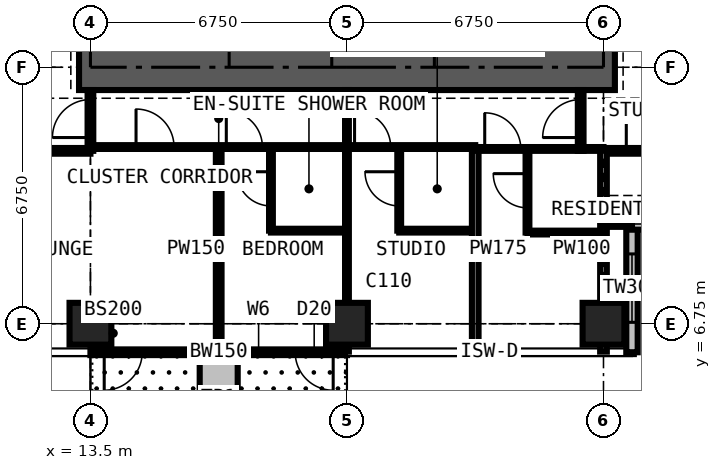
"""IFC4 building model, lengths in metres.
Left out: names, types, materials, properties, quantities, classifications, styles, units other than length and angle.
Written with IfcOpenShell. Run it as: python <this file> out.ifc"""

import sys

from ifc_helpers import new_model, si_unit, direction, frame, frame_2d, origin, origin_2d, place, context, subcontext, project, spatial, rectangle, extrude, element, fill, save


model = new_model("IFC4")
c1 = context("Model", 3, precision=1e-05, world=origin(), true_north=direction((0.0, 1.0)))
c2 = subcontext(c1, "Body", "Model", "MODEL_VIEW")
j1 = project(units=[si_unit("LENGTHUNIT", "METRE"), si_unit("PLANEANGLEUNIT", "RADIAN")], contexts=[c1])
p1 = place(None, origin())
s1 = spatial("IfcSite", under=j1, at=p1, CompositionType="ELEMENT")
p2 = place(p1, origin())
s2 = spatial("IfcBuilding", under=s1, at=p2, CompositionType="ELEMENT")
p3 = place(p2, frame((0.0, 0.0, 211.5)))
s3 = spatial("IfcBuildingStorey", under=s2, at=p3, CompositionType="ELEMENT", Elevation=211.5)
for number, where, z_axis, x_axis in (
    (1, (13.5, 6.75, 0.0), (0.0, 0.0, 1.0), (1.0, 0.0, 0.0)),
    (2, (20.25, 6.75, 0.0), (0.0, 0.0, 1.0), (1.0, 0.0, 0.0)),
    (3, (27.0, 6.75, 0.0), (0.0, 0.0, 1.0), (1.0, 0.0, 0.0)),
):
    element("IfcColumn", number, at=place(p3, frame(where, z_axis=z_axis, x_axis=x_axis)), inside=s3, PredefinedType="COLUMN", context=c2, shape_type="SweptSolid", body=[
        extrude(rectangle(XDim=1.1, YDim=1.1, at=origin_2d()), origin(), (0.0, 0.0, 1.0), 3.6),
    ])
p4 = place(p3, frame((13.2, 13.5, 0.0), z_axis=(0.0, 0.0, 1.0), x_axis=(1.0, 0.0, 0.0)))
e4 = element("IfcWall", 4, at=p4, inside=s3, PredefinedType="SHEAR", context=c2, shape_type="SweptSolid", body=[
    extrude(rectangle(XDim=14.1, YDim=1.2, at=frame_2d((7.05, 0.0))), origin(), (0.0, 0.0, 1.0), 3.6),
])
p5 = place(p3, frame((20.25, 6.0, 0.0), z_axis=(0.0, 0.0, 1.0), x_axis=(-1.0, 0.0, 0.0)))
e5 = element("IfcWall", 5, at=p5, inside=s3, PredefinedType="SOLIDWALL", context=c2, shape_type="SweptSolid", body=[
    extrude(rectangle(XDim=6.75, YDim=0.15, at=frame_2d((3.375, 0.0))), origin(), (0.0, 0.0, 1.0), 3.375),
])
p6 = place(p5, frame((0.363, 0.0, 0.0)))
e6 = element("IfcOpeningElement", 6, at=p6, cuts=e5, PredefinedType="OPENING", context=c2, shape_type="SweptSolid", body=[
    extrude(rectangle(XDim=1.0, YDim=2.2, at=frame_2d((0.5, 1.1))), frame((0.0, 0.085, 0.0), z_axis=(0.0, -1.0, 0.0), x_axis=(1.0, 0.0, 0.0)), (0.0, 0.0, 1.0), 0.17),
])
p7 = place(p5, frame((1.725, 0.0, 0.9)))
e7 = element("IfcOpeningElement", 7, at=p7, cuts=e5, PredefinedType="OPENING", context=c2, shape_type="SweptSolid", body=[
    extrude(rectangle(XDim=1.2, YDim=1.8, at=frame_2d((0.6, 0.9))), frame((0.0, 0.085, 0.0), z_axis=(0.0, -1.0, 0.0), x_axis=(1.0, 0.0, 0.0)), (0.0, 0.0, 1.0), 0.17),
])
p8 = place(p5, frame((5.387, 0.0, 0.0)))
e8 = element("IfcOpeningElement", 8, at=p8, cuts=e5, PredefinedType="OPENING", context=c2, shape_type="SweptSolid", body=[
    extrude(rectangle(XDim=1.0, YDim=2.2, at=frame_2d((0.5, 1.1))), frame((0.0, 0.085, 0.0), z_axis=(0.0, -1.0, 0.0), x_axis=(1.0, 0.0, 0.0)), (0.0, 0.0, 1.0), 0.17),
])
p9 = place(p5, frame((3.825, 0.0, 0.9)))
e9 = element("IfcOpeningElement", 9, at=p9, cuts=e5, PredefinedType="OPENING", context=c2, shape_type="SweptSolid", body=[
    extrude(rectangle(XDim=1.2, YDim=1.8, at=frame_2d((0.6, 0.9))), frame((0.0, 0.085, 0.0), z_axis=(0.0, -1.0, 0.0), x_axis=(1.0, 0.0, 0.0)), (0.0, 0.0, 1.0), 0.17),
])
p10 = place(p3, frame((27.75, 6.0, 0.0), z_axis=(0.0, 0.0, 1.0), x_axis=(0.0, 1.0, 0.0)))
e10 = element("IfcWall", 10, at=p10, inside=s3, PredefinedType="SOLIDWALL", context=c2, shape_type="SweptSolid", body=[
    extrude(rectangle(XDim=3.375, YDim=0.3, at=frame_2d((1.688, 0.0))), origin(), (0.0, 0.0, 1.0), 3.375),
])
p11 = place(p10, frame((0.788, 0.0, 0.6)))
e11 = element("IfcOpeningElement", 11, at=p11, cuts=e10, PredefinedType="OPENING", context=c2, shape_type="SweptSolid", body=[
    extrude(rectangle(XDim=1.8, YDim=2.1, at=frame_2d((0.9, 1.05))), frame((0.0, 0.16, 0.0), z_axis=(0.0, -1.0, 0.0), x_axis=(1.0, 0.0, 0.0)), (0.0, 0.0, 1.0), 0.32),
])
p12 = place(p3, frame((27.75, 9.375, 0.0), z_axis=(0.0, 0.0, 1.0), x_axis=(1.0, 0.0, 0.0)))
e12 = element("IfcWall", 12, at=p12, inside=s3, PredefinedType="SOLIDWALL", context=c2, shape_type="SweptSolid", body=[
    extrude(rectangle(XDim=3.375, YDim=0.3, at=frame_2d((1.688, 0.0))), origin(), (0.0, 0.0, 1.0), 3.375),
])
p13 = place(p12, frame((0.788, 0.0, 0.6)))
e13 = element("IfcOpeningElement", 13, at=p13, cuts=e12, PredefinedType="OPENING", context=c2, shape_type="SweptSolid", body=[
    extrude(rectangle(XDim=1.8, YDim=2.1, at=frame_2d((0.9, 1.05))), frame((0.0, 0.16, 0.0), z_axis=(0.0, -1.0, 0.0), x_axis=(1.0, 0.0, 0.0)), (0.0, 0.0, 1.0), 0.32),
])
p14 = place(p3, frame((16.875, 5.9, 0.0), z_axis=(0.0, 0.0, 1.0), x_axis=(0.0, -1.0, 0.0)))
e14 = element("IfcWall", 14, at=p14, inside=s3, PredefinedType="USERDEFINED", context=c2, shape_type="SweptSolid", body=[
    extrude(rectangle(XDim=2.2, YDim=1.0, at=frame_2d((1.1, 0.0))), origin(), (0.0, 0.0, 1.0), 0.9),
])
p15 = place(p3, frame((10.125, 11.3, 0.0), z_axis=(0.0, 0.0, 1.0), x_axis=(1.0, 0.0, 0.0)))
e15 = element("IfcWall", 15, at=p15, inside=s3, PredefinedType="PARTITIONING", context=c2, shape_type="SweptSolid", body=[
    extrude(rectangle(XDim=3.375, YDim=0.15, at=frame_2d((1.688, 0.0))), origin(), (0.0, 0.0, 1.0), 3.375),
])
p16 = place(p3, frame((13.5, 11.3, 0.0), z_axis=(0.0, 0.0, 1.0), x_axis=(0.0, 1.0, 0.0)))
e16 = element("IfcWall", 16, at=p16, inside=s3, PredefinedType="PARTITIONING", context=c2, shape_type="SweptSolid", body=[
    extrude(rectangle(XDim=1.6, YDim=0.15, at=frame_2d((0.8, 0.0))), origin(), (0.0, 0.0, 1.0), 2.877),
])
p17 = place(p16, frame((0.35, 0.0, 0.0)))
e17 = element("IfcOpeningElement", 17, at=p17, cuts=e16, PredefinedType="OPENING", context=c2, shape_type="SweptSolid", body=[
    extrude(rectangle(XDim=1.0, YDim=2.2, at=frame_2d((0.5, 1.1))), frame((0.0, 0.085, 0.0), z_axis=(0.0, -1.0, 0.0), x_axis=(1.0, 0.0, 0.0)), (0.0, 0.0, 1.0), 0.17),
])
p18 = place(p3, frame((13.5, 11.4, 0.0), z_axis=(0.0, 0.0, 1.0), x_axis=(1.0, 0.0, 0.0)))
e18 = element("IfcWall", 18, at=p18, inside=s3, PredefinedType="PARTITIONING", context=c2, shape_type="SweptSolid", body=[
    extrude(rectangle(XDim=10.125, YDim=0.1, at=frame_2d((5.062, 0.0))), origin(), (0.0, 0.0, 1.0), 3.375),
])
p19 = place(p18, frame((1.2, 0.0, 0.0)))
e19 = element("IfcOpeningElement", 19, at=p19, cuts=e18, PredefinedType="OPENING", context=c2, shape_type="SweptSolid", body=[
    extrude(rectangle(XDim=1.0, YDim=2.2, at=frame_2d((0.5, 1.1))), frame((0.0, 0.06, 0.0), z_axis=(0.0, -1.0, 0.0), x_axis=(1.0, 0.0, 0.0)), (0.0, 0.0, 1.0), 0.12),
])
p20 = place(p18, frame((3.575, 0.0, 0.0)))
e20 = element("IfcOpeningElement", 20, at=p20, cuts=e18, PredefinedType="OPENING", context=c2, shape_type="SweptSolid", body=[
    extrude(rectangle(XDim=0.95, YDim=2.2, at=frame_2d((0.475, 1.1))), frame((0.0, 0.06, 0.0), z_axis=(0.0, -1.0, 0.0), x_axis=(1.0, 0.0, 0.0)), (0.0, 0.0, 1.0), 0.12),
])
p21 = place(p18, frame((6.95, 0.0, 0.0)))
e21 = element("IfcOpeningElement", 21, at=p21, cuts=e18, PredefinedType="OPENING", context=c2, shape_type="SweptSolid", body=[
    extrude(rectangle(XDim=0.95, YDim=2.2, at=frame_2d((0.475, 1.1))), frame((0.0, 0.06, 0.0), z_axis=(0.0, -1.0, 0.0), x_axis=(1.0, 0.0, 0.0)), (0.0, 0.0, 1.0), 0.12),
])
p22 = place(p3, frame((16.875, 6.016, 0.0), z_axis=(0.0, 0.0, 1.0), x_axis=(0.0, 1.0, 0.0)))
e22 = element("IfcWall", 22, at=p22, inside=s3, PredefinedType="PARTITIONING", context=c2, shape_type="SweptSolid", body=[
    extrude(rectangle(XDim=5.384, YDim=0.15, at=frame_2d((2.692, 0.0))), origin(), (0.0, 0.0, 1.0), 3.375),
])
p23 = place(p3, frame((18.25, 9.2, 0.0), z_axis=(0.0, 0.0, 1.0), x_axis=(0.0, 1.0, 0.0)))
e23 = element("IfcWall", 23, at=p23, inside=s3, PredefinedType="PARTITIONING", context=c2, shape_type="SweptSolid", body=[
    extrude(rectangle(XDim=2.2, YDim=0.1, at=frame_2d((1.1, 0.0))), origin(), (0.0, 0.0, 1.0), 3.375),
])
p24 = place(p23, frame((0.65, 0.0, 0.0)))
e24 = element("IfcOpeningElement", 24, at=p24, cuts=e23, PredefinedType="OPENING", context=c2, shape_type="SweptSolid", body=[
    extrude(rectangle(XDim=0.9, YDim=2.2, at=frame_2d((0.45, 1.1))), frame((0.0, 0.06, 0.0), z_axis=(0.0, -1.0, 0.0), x_axis=(1.0, 0.0, 0.0)), (0.0, 0.0, 1.0), 0.12),
])
p25 = place(p3, frame((18.25, 9.2, 0.0), z_axis=(0.0, 0.0, 1.0), x_axis=(1.0, 0.0, 0.0)))
e25 = element("IfcWall", 25, at=p25, inside=s3, PredefinedType="PARTITIONING", context=c2, shape_type="SweptSolid", body=[
    extrude(rectangle(XDim=2.0, YDim=0.1, at=frame_2d((1.0, 0.0))), origin(), (0.0, 0.0, 1.0), 3.375),
])
p26 = place(p3, frame((20.25, 6.016, 0.0), z_axis=(0.0, 0.0, 1.0), x_axis=(0.0, 1.0, 0.0)))
e26 = element("IfcWall", 26, at=p26, inside=s3, PredefinedType="PARTITIONING", context=c2, shape_type="SweptSolid", body=[
    extrude(rectangle(XDim=6.884, YDim=0.1, at=frame_2d((3.442, 0.0))), origin(), (0.0, 0.0, 1.0), 2.877),
])
p27 = place(p3, frame((21.625, 9.2, 0.0), z_axis=(0.0, 0.0, 1.0), x_axis=(0.0, 1.0, 0.0)))
e27 = element("IfcWall", 27, at=p27, inside=s3, PredefinedType="PARTITIONING", context=c2, shape_type="SweptSolid", body=[
    extrude(rectangle(XDim=2.2, YDim=0.1, at=frame_2d((1.1, 0.0))), origin(), (0.0, 0.0, 1.0), 3.375),
])
p28 = place(p27, frame((0.65, 0.0, 0.0)))
e28 = element("IfcOpeningElement", 28, at=p28, cuts=e27, PredefinedType="OPENING", context=c2, shape_type="SweptSolid", body=[
    extrude(rectangle(XDim=0.9, YDim=2.2, at=frame_2d((0.45, 1.1))), frame((0.0, 0.06, 0.0), z_axis=(0.0, -1.0, 0.0), x_axis=(1.0, 0.0, 0.0)), (0.0, 0.0, 1.0), 0.12),
])
p29 = place(p3, frame((21.625, 9.2, 0.0), z_axis=(0.0, 0.0, 1.0), x_axis=(1.0, 0.0, 0.0)))
e29 = element("IfcWall", 29, at=p29, inside=s3, PredefinedType="PARTITIONING", context=c2, shape_type="SweptSolid", body=[
    extrude(rectangle(XDim=2.0, YDim=0.1, at=frame_2d((1.0, 0.0))), origin(), (0.0, 0.0, 1.0), 3.375),
])
p30 = place(p3, frame((23.625, 6.016, 0.0), z_axis=(0.0, 0.0, 1.0), x_axis=(0.0, 1.0, 0.0)))
e30 = element("IfcWall", 30, at=p30, inside=s3, PredefinedType="PARTITIONING", context=c2, shape_type="SweptSolid", body=[
    extrude(rectangle(XDim=5.384, YDim=0.175, at=frame_2d((2.692, 0.0))), origin(), (0.0, 0.0, 1.0), 3.375),
])
p31 = place(p3, frame((23.625, 11.35, 0.0), z_axis=(0.0, 0.0, 1.0), x_axis=(1.0, 0.0, 0.0)))
e31 = element("IfcWall", 31, at=p31, inside=s3, PredefinedType="PARTITIONING", context=c2, shape_type="SweptSolid", body=[
    extrude(rectangle(XDim=3.375, YDim=0.1, at=frame_2d((1.688, 0.0))), origin(), (0.0, 0.0, 1.0), 3.375),
])
p32 = place(p31, frame((0.25, 0.0, 0.0)))
e32 = element("IfcOpeningElement", 32, at=p32, cuts=e31, PredefinedType="OPENING", context=c2, shape_type="SweptSolid", body=[
    extrude(rectangle(XDim=0.95, YDim=2.2, at=frame_2d((0.475, 1.1))), frame((0.0, 0.06, 0.0), z_axis=(0.0, -1.0, 0.0), x_axis=(1.0, 0.0, 0.0)), (0.0, 0.0, 1.0), 0.12),
])
p33 = place(p3, frame((25.0, 9.15, 0.0), z_axis=(0.0, 0.0, 1.0), x_axis=(0.0, 1.0, 0.0)))
e33 = element("IfcWall", 33, at=p33, inside=s3, PredefinedType="PARTITIONING", context=c2, shape_type="SweptSolid", body=[
    extrude(rectangle(XDim=2.2, YDim=0.1, at=frame_2d((1.1, 0.0))), origin(), (0.0, 0.0, 1.0), 3.375),
])
p34 = place(p33, frame((0.65, 0.0, 0.0)))
e34 = element("IfcOpeningElement", 34, at=p34, cuts=e33, PredefinedType="OPENING", context=c2, shape_type="SweptSolid", body=[
    extrude(rectangle(XDim=0.9, YDim=2.2, at=frame_2d((0.45, 1.1))), frame((0.0, 0.06, 0.0), z_axis=(0.0, -1.0, 0.0), x_axis=(1.0, 0.0, 0.0)), (0.0, 0.0, 1.0), 0.12),
])
p35 = place(p3, frame((25.0, 9.15, 0.0), z_axis=(0.0, 0.0, 1.0), x_axis=(1.0, 0.0, 0.0)))
e35 = element("IfcWall", 35, at=p35, inside=s3, PredefinedType="PARTITIONING", context=c2, shape_type="SweptSolid", body=[
    extrude(rectangle(XDim=2.0, YDim=0.1, at=frame_2d((1.0, 0.0))), origin(), (0.0, 0.0, 1.0), 3.375),
])
p36 = place(p3, frame((26.4, 11.3, 0.0), z_axis=(0.0, 0.0, 1.0), x_axis=(0.0, 1.0, 0.0)))
e36 = element("IfcWall", 36, at=p36, inside=s3, PredefinedType="PARTITIONING", context=c2, shape_type="SweptSolid", body=[
    extrude(rectangle(XDim=1.6, YDim=0.15, at=frame_2d((0.8, 0.0))), origin(), (0.0, 0.0, 1.0), 3.375),
])
p37 = place(p36, frame((0.35, 0.0, 0.0)))
e37 = element("IfcOpeningElement", 37, at=p37, cuts=e36, PredefinedType="OPENING", context=c2, shape_type="SweptSolid", body=[
    extrude(rectangle(XDim=1.0, YDim=2.2, at=frame_2d((0.5, 1.1))), frame((0.0, 0.085, 0.0), z_axis=(0.0, -1.0, 0.0), x_axis=(1.0, 0.0, 0.0)), (0.0, 0.0, 1.0), 0.17),
])
p38 = place(p3, frame((27.0, 11.3, 0.0), z_axis=(0.0, 0.0, 1.0), x_axis=(1.0, 0.0, 0.0)))
e38 = element("IfcWall", 38, at=p38, inside=s3, PredefinedType="PARTITIONING", context=c2, shape_type="SweptSolid", body=[
    extrude(rectangle(XDim=3.375, YDim=0.15, at=frame_2d((1.688, 0.0))), origin(), (0.0, 0.0, 1.0), 3.375),
])
p39 = place(p38, frame((0.6, 0.0, 0.0)))
e39 = element("IfcOpeningElement", 39, at=p39, cuts=e38, PredefinedType="OPENING", context=c2, shape_type="SweptSolid", body=[
    extrude(rectangle(XDim=1.0, YDim=2.2, at=frame_2d((0.5, 1.1))), frame((0.0, 0.085, 0.0), z_axis=(0.0, -1.0, 0.0), x_axis=(1.0, 0.0, 0.0)), (0.0, 0.0, 1.0), 0.17),
])
p40 = place(p3, frame((27.0, 6.016, 0.0), z_axis=(0.0, 0.0, 1.0), x_axis=(0.0, 1.0, 0.0)))
e40 = element("IfcWall", 40, at=p40, inside=s3, PredefinedType="PARTITIONING", context=c2, shape_type="SweptSolid", body=[
    extrude(rectangle(XDim=5.334, YDim=0.175, at=frame_2d((2.667, 0.0))), origin(), (0.0, 0.0, 1.0), 2.877),
])
p41 = place(p3, frame((27.0, 9.375, 0.0), z_axis=(0.0, 0.0, 1.0), x_axis=(1.0, 0.0, 0.0)))
e41 = element("IfcWall", 41, at=p41, inside=s3, PredefinedType="PARTITIONING", context=c2, shape_type="SweptSolid", body=[
    extrude(rectangle(XDim=0.734, YDim=0.15, at=frame_2d((0.367, 0.0))), origin(), (0.0, 0.0, 1.0), 3.375),
])
p42 = place(p6, origin())
e42 = element("IfcDoor", 42, at=p42, inside=s3, OperationType="SINGLE_SWING_LEFT", PredefinedType="DOOR", context=c2, shape_type="SweptSolid", body=[
    extrude(rectangle(XDim=1.0, YDim=2.2, at=frame_2d((0.5, 1.1))), frame((0.0, 0.025, 0.0), z_axis=(0.0, -1.0, 0.0), x_axis=(1.0, 0.0, 0.0)), (0.0, 0.0, 1.0), 0.05),
])
fill(e6, e42)
p43 = place(p7, origin())
e43 = element("IfcWindow", 43, at=p43, inside=s3, PartitioningType="SINGLE_PANEL", PredefinedType="WINDOW", context=c2, shape_type="SweptSolid", body=[
    extrude(rectangle(XDim=1.2, YDim=1.8, at=frame_2d((0.6, 0.9))), frame((0.0, 0.03, 0.0), z_axis=(0.0, -1.0, 0.0), x_axis=(1.0, 0.0, 0.0)), (0.0, 0.0, 1.0), 0.06),
])
fill(e7, e43)
p44 = place(p8, origin())
e44 = element("IfcDoor", 44, at=p44, inside=s3, OperationType="SINGLE_SWING_RIGHT", PredefinedType="DOOR", context=c2, shape_type="SweptSolid", body=[
    extrude(rectangle(XDim=1.0, YDim=2.2, at=frame_2d((0.5, 1.1))), frame((0.0, 0.025, 0.0), z_axis=(0.0, -1.0, 0.0), x_axis=(1.0, 0.0, 0.0)), (0.0, 0.0, 1.0), 0.05),
])
fill(e8, e44)
p45 = place(p9, origin())
e45 = element("IfcWindow", 45, at=p45, inside=s3, PartitioningType="SINGLE_PANEL", PredefinedType="WINDOW", context=c2, shape_type="SweptSolid", body=[
    extrude(rectangle(XDim=1.2, YDim=1.8, at=frame_2d((0.6, 0.9))), frame((0.0, 0.03, 0.0), z_axis=(0.0, -1.0, 0.0), x_axis=(1.0, 0.0, 0.0)), (0.0, 0.0, 1.0), 0.06),
])
fill(e9, e45)
p46 = place(p11, origin())
e46 = element("IfcWindow", 46, at=p46, inside=s3, PartitioningType="SINGLE_PANEL", PredefinedType="WINDOW", context=c2, shape_type="SweptSolid", body=[
    extrude(rectangle(XDim=1.8, YDim=2.1, at=frame_2d((0.9, 1.05))), frame((0.0, 0.03, 0.0), z_axis=(0.0, -1.0, 0.0), x_axis=(1.0, 0.0, 0.0)), (0.0, 0.0, 1.0), 0.06),
])
fill(e11, e46)
p47 = place(p19, origin())
e47 = element("IfcDoor", 47, at=p47, inside=s3, OperationType="SINGLE_SWING_LEFT", PredefinedType="DOOR", context=c2, shape_type="SweptSolid", body=[
    extrude(rectangle(XDim=1.0, YDim=2.2, at=frame_2d((0.5, 1.1))), frame((0.0, 0.025, 0.0), z_axis=(0.0, -1.0, 0.0), x_axis=(1.0, 0.0, 0.0)), (0.0, 0.0, 1.0), 0.05),
])
fill(e19, e47)
p48 = place(p20, origin())
e48 = element("IfcDoor", 48, at=p48, inside=s3, OperationType="SINGLE_SWING_LEFT", PredefinedType="DOOR", context=c2, shape_type="SweptSolid", body=[
    extrude(rectangle(XDim=0.95, YDim=2.2, at=frame_2d((0.475, 1.1))), frame((0.0, 0.025, 0.0), z_axis=(0.0, -1.0, 0.0), x_axis=(1.0, 0.0, 0.0)), (0.0, 0.0, 1.0), 0.05),
])
fill(e20, e48)
p49 = place(p24, origin())
e49 = element("IfcDoor", 49, at=p49, inside=s3, OperationType="SINGLE_SWING_RIGHT", PredefinedType="DOOR", context=c2, shape_type="SweptSolid", body=[
    extrude(rectangle(XDim=0.9, YDim=2.2, at=frame_2d((0.45, 1.1))), frame((0.0, 0.025, 0.0), z_axis=(0.0, -1.0, 0.0), x_axis=(1.0, 0.0, 0.0)), (0.0, 0.0, 1.0), 0.05),
])
fill(e24, e49)
p50 = place(p17, origin())
e50 = element("IfcDoor", 50, at=p50, inside=s3, OperationType="SINGLE_SWING_LEFT", PredefinedType="DOOR", context=c2, shape_type="SweptSolid", body=[
    extrude(rectangle(XDim=1.0, YDim=2.2, at=frame_2d((0.5, 1.1))), frame((0.0, 0.025, 0.0), z_axis=(0.0, -1.0, 0.0), x_axis=(1.0, 0.0, 0.0)), (0.0, 0.0, 1.0), 0.05),
])
fill(e17, e50)
p51 = place(p21, origin())
e51 = element("IfcDoor", 51, at=p51, inside=s3, OperationType="SINGLE_SWING_LEFT", PredefinedType="DOOR", context=c2, shape_type="SweptSolid", body=[
    extrude(rectangle(XDim=0.95, YDim=2.2, at=frame_2d((0.475, 1.1))), frame((0.0, 0.025, 0.0), z_axis=(0.0, -1.0, 0.0), x_axis=(1.0, 0.0, 0.0)), (0.0, 0.0, 1.0), 0.05),
])
fill(e21, e51)
p52 = place(p28, origin())
e52 = element("IfcDoor", 52, at=p52, inside=s3, OperationType="SINGLE_SWING_RIGHT", PredefinedType="DOOR", context=c2, shape_type="SweptSolid", body=[
    extrude(rectangle(XDim=0.9, YDim=2.2, at=frame_2d((0.45, 1.1))), frame((0.0, 0.025, 0.0), z_axis=(0.0, -1.0, 0.0), x_axis=(1.0, 0.0, 0.0)), (0.0, 0.0, 1.0), 0.05),
])
fill(e28, e52)
p53 = place(p32, origin())
e53 = element("IfcDoor", 53, at=p53, inside=s3, OperationType="SINGLE_SWING_LEFT", PredefinedType="DOOR", context=c2, shape_type="SweptSolid", body=[
    extrude(rectangle(XDim=0.95, YDim=2.2, at=frame_2d((0.475, 1.1))), frame((0.0, 0.025, 0.0), z_axis=(0.0, -1.0, 0.0), x_axis=(1.0, 0.0, 0.0)), (0.0, 0.0, 1.0), 0.05),
])
fill(e32, e53)
p54 = place(p34, origin())
e54 = element("IfcDoor", 54, at=p54, inside=s3, OperationType="SINGLE_SWING_RIGHT", PredefinedType="DOOR", context=c2, shape_type="SweptSolid", body=[
    extrude(rectangle(XDim=0.9, YDim=2.2, at=frame_2d((0.45, 1.1))), frame((0.0, 0.025, 0.0), z_axis=(0.0, -1.0, 0.0), x_axis=(1.0, 0.0, 0.0)), (0.0, 0.0, 1.0), 0.05),
])
fill(e34, e54)
p55 = place(p39, origin())
e55 = element("IfcDoor", 55, at=p55, inside=s3, OperationType="SINGLE_SWING_LEFT", PredefinedType="DOOR", context=c2, shape_type="SweptSolid", body=[
    extrude(rectangle(XDim=1.0, YDim=2.2, at=frame_2d((0.5, 1.1))), frame((0.0, 0.025, 0.0), z_axis=(0.0, -1.0, 0.0), x_axis=(1.0, 0.0, 0.0)), (0.0, 0.0, 1.0), 0.05),
])
fill(e39, e55)
p56 = place(p37, origin())
e56 = element("IfcDoor", 56, at=p56, inside=s3, OperationType="SINGLE_SWING_LEFT", PredefinedType="DOOR", context=c2, shape_type="SweptSolid", body=[
    extrude(rectangle(XDim=1.0, YDim=2.2, at=frame_2d((0.5, 1.1))), frame((0.0, 0.025, 0.0), z_axis=(0.0, -1.0, 0.0), x_axis=(1.0, 0.0, 0.0)), (0.0, 0.0, 1.0), 0.05),
])
fill(e37, e56)
save(model, sys.argv[1])
